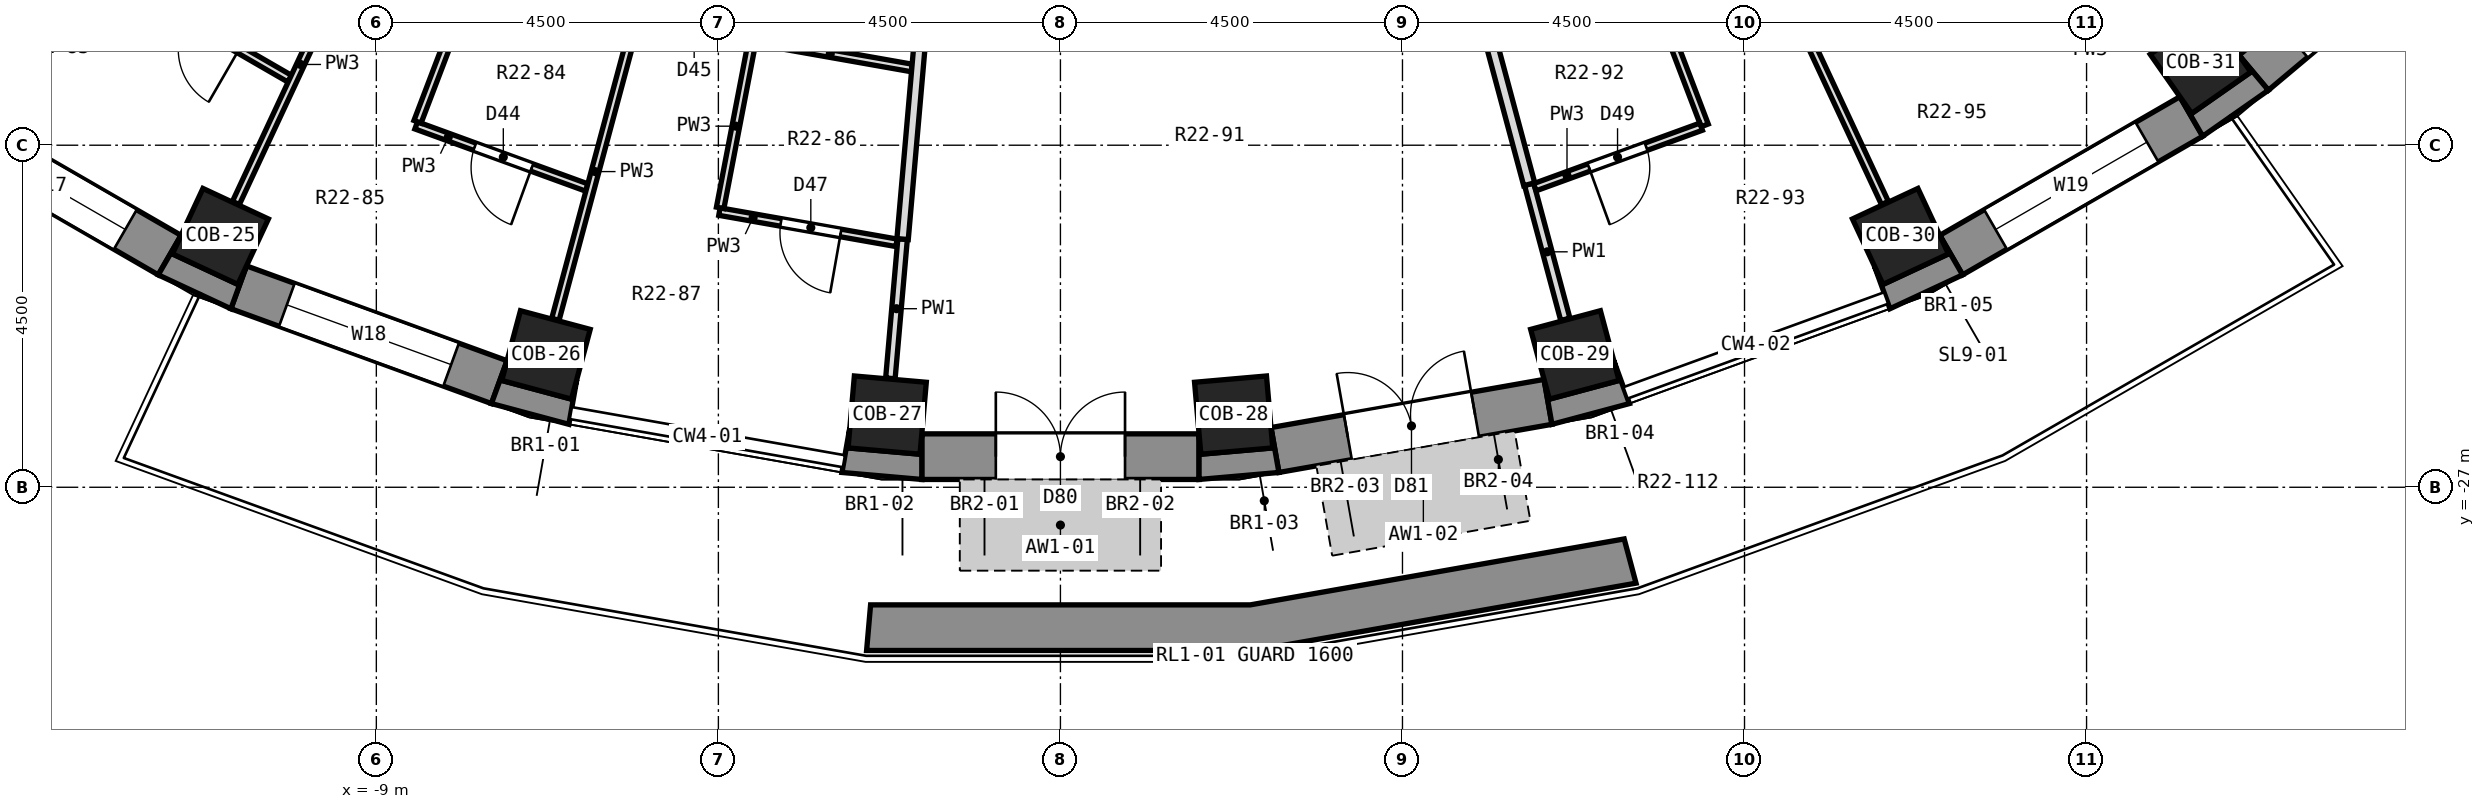
"""IFC4 building model, lengths in metres.
Left out: names, types, materials, properties, quantities, classifications, styles, units other than length and angle.
Written with IfcOpenShell. Run it as: python <this file> out.ifc"""

import sys

from ifc_helpers import new_model, si_unit, direction, frame, frame_2d, origin, origin_2d, place, context, subcontext, project, spatial, polyline, rectangle, outline, extrude, element, fill, save


model = new_model("IFC4")
c1 = context("Model", 3, precision=1e-05, world=origin(), true_north=direction((0.0, 1.0)))
c2 = subcontext(c1, "Body", "Model", "MODEL_VIEW")
j1 = project(units=[si_unit("LENGTHUNIT", "METRE"), si_unit("PLANEANGLEUNIT", "RADIAN")], contexts=[c1])
p1 = place(None, origin())
s1 = spatial("IfcSite", under=j1, at=p1, CompositionType="ELEMENT")
p2 = place(p1, origin())
s2 = spatial("IfcBuilding", under=s1, at=p2, CompositionType="ELEMENT")
p3 = place(p2, frame((0.0, 0.0, 141.4)))
s3 = spatial("IfcBuildingStorey", under=s2, at=p3, CompositionType="ELEMENT", Elevation=141.4)
for number, where, z_axis, x_axis in (
    (1, (-11.052, -23.7, 0.0), (0.0, 0.0, 1.0), (-0.423, -0.906, 0.0)),
    (2, (-6.768, -25.259, 0.0), (0.0, 0.0, 1.0), (-0.259, -0.966, 0.0)),
    (3, (-2.279, -26.051, 0.0), (0.0, 0.0, 1.0), (-0.087, -0.996, 0.0)),
    (4, (2.279, -26.051, 0.0), (0.0, 0.0, 1.0), (0.087, -0.996, 0.0)),
    (5, (6.768, -25.259, 0.0), (0.0, 0.0, 1.0), (0.259, -0.966, 0.0)),
    (6, (11.052, -23.7, 0.0), (0.0, 0.0, 1.0), (0.423, -0.906, 0.0)),
    (7, (14.999, -21.421, 0.0), (0.0, 0.0, 1.0), (0.574, -0.819, 0.0)),
):
    element("IfcColumn", number, at=place(p3, frame(where, z_axis=z_axis, x_axis=x_axis)), inside=s3, PredefinedType="COLUMN", context=c2, shape_type="SweptSolid", body=[
        extrude(rectangle(XDim=0.95, YDim=0.95, at=origin_2d()), origin(), (0.0, 0.0, 1.0), 3.3),
    ])
p4 = place(p3, frame((-14.878, -22.122, 0.0), z_axis=(0.0, 0.0, 1.0), x_axis=(0.866051847062, -0.499954196102, 0.0)))
e8 = element("IfcWall", 8, at=p4, inside=s3, PredefinedType="SOLIDWALL", context=c2, shape_type="SweptSolid", body=[
    extrude(rectangle(XDim=3.648, YDim=0.6, at=frame_2d((1.824, 0.0))), origin(), (0.0, 0.0, 1.0), 2.8),
])
p5 = place(p4, frame((0.674, 0.0, 0.9)))
e9 = element("IfcOpeningElement", 9, at=p5, cuts=e8, PredefinedType="OPENING", context=c2, shape_type="SweptSolid", body=[
    extrude(rectangle(XDim=2.3, YDim=1.8, at=frame_2d((1.15, 0.9))), frame((0.0, 0.312, 0.0), z_axis=(0.0, -1.0, 0.0), x_axis=(1.0, 0.0, 0.0)), (0.0, 0.0, 1.0), 0.624),
])
p6 = place(p3, frame((-10.811, -24.369, 0.0), z_axis=(0.0, 0.0, 1.0), x_axis=(0.939703505393, -0.341990236633, 0.0)))
e10 = element("IfcWall", 10, at=p6, inside=s3, PredefinedType="SOLIDWALL", context=c2, shape_type="SweptSolid", body=[
    extrude(rectangle(XDim=3.648, YDim=0.6, at=frame_2d((1.824, 0.0))), origin(), (0.0, 0.0, 1.0), 2.8),
])
p7 = place(p6, frame((0.674, 0.0, 0.9)))
e11 = element("IfcOpeningElement", 11, at=p7, cuts=e10, PredefinedType="OPENING", context=c2, shape_type="SweptSolid", body=[
    extrude(rectangle(XDim=2.3, YDim=1.8, at=frame_2d((1.15, 0.9))), frame((0.0, 0.312, 0.0), z_axis=(0.0, -1.0, 0.0), x_axis=(1.0, 0.0, 0.0)), (0.0, 0.0, 1.0), 0.624),
])
p8 = place(p3, frame((-1.824, -26.597, 0.0), z_axis=(0.0, 0.0, 1.0), x_axis=(1.0, 0.0, 0.0)))
e12 = element("IfcWall", 12, at=p8, inside=s3, PredefinedType="SOLIDWALL", context=c2, shape_type="SweptSolid", body=[
    extrude(rectangle(XDim=3.648, YDim=0.6, at=frame_2d((1.824, 0.0))), origin(), (0.0, 0.0, 1.0), 2.8),
])
p9 = place(p8, frame((0.974, 0.0, 0.0)))
e13 = element("IfcOpeningElement", 13, at=p9, cuts=e12, PredefinedType="OPENING", context=c2, shape_type="SweptSolid", body=[
    extrude(rectangle(XDim=1.7, YDim=2.4, at=frame_2d((0.85, 1.2))), frame((0.0, 0.312, 0.0), z_axis=(0.0, -1.0, 0.0), x_axis=(1.0, 0.0, 0.0)), (0.0, 0.0, 1.0), 0.624),
])
p10 = place(p3, frame((2.822, -26.51, 0.0), z_axis=(0.0, 0.0, 1.0), x_axis=(0.984803764455, 0.173670796382, 0.0)))
e14 = element("IfcWall", 14, at=p10, inside=s3, PredefinedType="SOLIDWALL", context=c2, shape_type="SweptSolid", body=[
    extrude(rectangle(XDim=3.648, YDim=0.6, at=frame_2d((1.824, 0.0))), origin(), (0.0, 0.0, 1.0), 2.8),
])
p11 = place(p10, frame((0.974, 0.0, 0.0)))
e15 = element("IfcOpeningElement", 15, at=p11, cuts=e14, PredefinedType="OPENING", context=c2, shape_type="SweptSolid", body=[
    extrude(rectangle(XDim=1.7, YDim=2.4, at=frame_2d((0.85, 1.2))), frame((0.0, 0.312, 0.0), z_axis=(0.0, -1.0, 0.0), x_axis=(1.0, 0.0, 0.0)), (0.0, 0.0, 1.0), 0.624),
])
p12 = place(p3, frame((11.719, -23.946, 0.0), z_axis=(0.0, 0.0, 1.0), x_axis=(0.866051847062, 0.499954196102, 0.0)))
e16 = element("IfcWall", 16, at=p12, inside=s3, PredefinedType="SOLIDWALL", context=c2, shape_type="SweptSolid", body=[
    extrude(rectangle(XDim=3.648, YDim=0.6, at=frame_2d((1.824, 0.0))), origin(), (0.0, 0.0, 1.0), 2.8),
])
p13 = place(p12, frame((0.674, 0.0, 0.9)))
e17 = element("IfcOpeningElement", 17, at=p13, cuts=e16, PredefinedType="OPENING", context=c2, shape_type="SweptSolid", body=[
    extrude(rectangle(XDim=2.3, YDim=1.8, at=frame_2d((1.15, 0.9))), frame((0.0, 0.312, 0.0), z_axis=(0.0, -1.0, 0.0), x_axis=(1.0, 0.0, 0.0)), (0.0, 0.0, 1.0), 0.624),
])
p14 = place(p3, frame((15.699, -21.547, 0.0), z_axis=(0.0, 0.0, 1.0), x_axis=(0.766055462616, 0.642774476932, 0.0)))
e18 = element("IfcWall", 18, at=p14, inside=s3, PredefinedType="SOLIDWALL", context=c2, shape_type="SweptSolid", body=[
    extrude(rectangle(XDim=3.648, YDim=0.6, at=frame_2d((1.824, 0.0))), origin(), (0.0, 0.0, 1.0), 2.8),
])
p15 = place(p14, frame((0.674, 0.0, 0.9)))
e19 = element("IfcOpeningElement", 19, at=p15, cuts=e18, PredefinedType="OPENING", context=c2, shape_type="SweptSolid", body=[
    extrude(rectangle(XDim=2.3, YDim=1.8, at=frame_2d((1.15, 0.9))), frame((0.0, 0.312, 0.0), z_axis=(0.0, -1.0, 0.0), x_axis=(1.0, 0.0, 0.0)), (0.0, 0.0, 1.0), 0.624),
])
p16 = place(p3, origin())
e20 = element("IfcWall", 20, at=p16, inside=s3, PredefinedType="SOLIDWALL", context=c2, shape_type="SweptSolid", body=[
    extrude(outline(polyline([(-10.913, -24.651), (-10.708, -24.087), (-10.822, -24.331), (-11.683, -23.93), (-11.569, -23.686), (-11.869, -24.206), (-10.913, -24.651)])), origin(), (0.0, 0.0, 1.0), 2.8),
])
p17 = place(p3, origin())
e21 = element("IfcWall", 21, at=p17, inside=s3, PredefinedType="SOLIDWALL", context=c2, shape_type="SweptSolid", body=[
    extrude(outline(polyline([(-7.486, -25.899), (-6.467, -26.172), (-6.363, -25.581), (-6.432, -25.841), (-7.35, -25.595), (-7.28, -25.335), (-7.486, -25.899)])), origin(), (0.0, 0.0, 1.0), 2.8),
])
p18 = place(p3, origin())
e22 = element("IfcWall", 22, at=p18, inside=s3, PredefinedType="SOLIDWALL", context=c2, shape_type="SweptSolid", body=[
    extrude(outline(polyline([(-2.875, -26.805), (-1.824, -26.897), (-1.824, -26.297), (-1.847, -26.565), (-2.794, -26.482), (-2.77, -26.215), (-2.875, -26.805)])), origin(), (0.0, 0.0, 1.0), 2.8),
])
p19 = place(p3, origin())
e23 = element("IfcWall", 23, at=p19, inside=s3, PredefinedType="SOLIDWALL", context=c2, shape_type="SweptSolid", body=[
    extrude(outline(polyline([(2.875, -26.805), (2.77, -26.215), (2.794, -26.482), (1.847, -26.565), (1.824, -26.297), (1.824, -26.897), (2.875, -26.805)])), origin(), (0.0, 0.0, 1.0), 2.8),
])
p20 = place(p3, origin())
e24 = element("IfcWall", 24, at=p20, inside=s3, PredefinedType="SOLIDWALL", context=c2, shape_type="SweptSolid", body=[
    extrude(outline(polyline([(6.467, -26.172), (7.486, -25.899), (7.28, -25.335), (7.35, -25.595), (6.432, -25.841), (6.363, -25.581), (6.467, -26.172)])), origin(), (0.0, 0.0, 1.0), 2.8),
])
p21 = place(p3, origin())
e25 = element("IfcWall", 25, at=p21, inside=s3, PredefinedType="SOLIDWALL", context=c2, shape_type="SweptSolid", body=[
    extrude(outline(polyline([(10.913, -24.651), (11.869, -24.206), (11.569, -23.686), (11.683, -23.93), (10.822, -24.331), (10.708, -24.087), (10.913, -24.651)])), origin(), (0.0, 0.0, 1.0), 2.8),
])
p22 = place(p3, origin())
e26 = element("IfcWall", 26, at=p22, inside=s3, PredefinedType="SOLIDWALL", context=c2, shape_type="SweptSolid", body=[
    extrude(outline(polyline([(15.892, -21.777), (15.506, -21.317), (15.661, -21.538), (14.882, -22.083), (14.728, -21.862), (15.028, -22.382), (15.892, -21.777)])), origin(), (0.0, 0.0, 1.0), 2.8),
])
p23 = place(p3, origin())
e27 = element("IfcWall", 27, at=p23, inside=s3, PredefinedType="PARAPET", context=c2, shape_type="SweptSolid", body=[
    extrude(outline(polyline([(-2.55, -29.147), (2.55, -29.147), (7.573, -28.262), (7.417, -27.68), (2.498, -28.547), (-2.498, -28.547), (-2.55, -29.147)])), origin(), (0.0, 0.0, 1.0), 0.5),
])
p24 = place(p3, frame((6.166, -23.014, 0.0), z_axis=(0.0, 0.0, 1.0), x_axis=(0.258802424466, -0.965930279622, 0.0)))
e28 = element("IfcWall", 28, at=p24, inside=s3, PredefinedType="PARTITIONING", context=c2, shape_type="SweptSolid", body=[
    extrude(rectangle(XDim=1.84, YDim=0.125, at=frame_2d((0.92, 0.0))), origin(), (0.0, 0.0, 1.0), 2.8),
])
p25 = place(p3, frame((4.288, -16.002, 0.0), z_axis=(0.0, 0.0, 1.0), x_axis=(0.25900000819, -0.965877319207, 0.0)))
e29 = element("IfcWall", 29, at=p25, inside=s3, PredefinedType="PARTITIONING", context=c2, shape_type="SweptSolid", body=[
    extrude(rectangle(XDim=7.259, YDim=0.15, at=frame_2d((3.63, 0.0))), origin(), (0.0, 0.0, 1.0), 2.8),
])
p26 = place(p3, frame((7.657, -20.09, 0.0), z_axis=(0.0, 0.0, 1.0), x_axis=(0.35616749028, -0.934422130981, 0.0)))
e30 = element("IfcWall", 30, at=p26, inside=s3, PredefinedType="PARTITIONING", context=c2, shape_type="SweptSolid", body=[
    extrude(rectangle(XDim=2.3, YDim=0.1, at=frame_2d((1.15, 0.0))), origin(), (0.0, 0.0, 1.0), 2.8),
])
p27 = place(p3, frame((5.794, -12.43, 0.0), z_axis=(0.0, 0.0, 1.0), x_axis=(0.422795993745, -0.906224888023, 0.0)))
e31 = element("IfcWall", 31, at=p27, inside=s3, PredefinedType="PARTITIONING", context=c2, shape_type="SweptSolid", body=[
    extrude(rectangle(XDim=11.951, YDim=0.1, at=frame_2d((5.975, 0.0))), origin(), (0.0, 0.0, 1.0), 2.8),
])
p28 = place(p27, frame((3.451, 0.0, 0.0)))
e32 = element("IfcOpeningElement", 32, at=p28, cuts=e31, PredefinedType="OPENING", context=c2, shape_type="SweptSolid", body=[
    extrude(rectangle(XDim=0.9, YDim=2.1, at=frame_2d((0.45, 1.05))), frame((0.0, 0.062, 0.0), z_axis=(0.0, -1.0, 0.0), x_axis=(1.0, 0.0, 0.0)), (0.0, 0.0, 1.0), 0.124),
])
p29 = place(p3, frame((-12.209, -20.43, 0.0), z_axis=(0.0, 0.0, 1.0), x_axis=(0.865989934965, -0.500061428766, 0.0)))
e33 = element("IfcWall", 33, at=p29, inside=s3, PredefinedType="PARTITIONING", context=c2, shape_type="SweptSolid", body=[
    extrude(rectangle(XDim=2.39, YDim=0.1, at=frame_2d((1.195, 0.0))), origin(), (0.0, 0.0, 1.0), 2.8),
])
p30 = place(p29, frame((0.82, 0.0, 0.0)))
e34 = element("IfcOpeningElement", 34, at=p30, cuts=e33, PredefinedType="OPENING", context=c2, shape_type="SweptSolid", body=[
    extrude(rectangle(XDim=0.8, YDim=2.1, at=frame_2d((0.4, 1.05))), frame((0.0, 0.062, 0.0), z_axis=(0.0, -1.0, 0.0), x_axis=(1.0, 0.0, 0.0)), (0.0, 0.0, 1.0), 0.124),
])
p31 = place(p3, frame((-8.476, -22.239, 0.0), z_axis=(0.0, 0.0, 1.0), x_axis=(0.939644231496, -0.342153062556, 0.0)))
e35 = element("IfcWall", 35, at=p31, inside=s3, PredefinedType="PARTITIONING", context=c2, shape_type="SweptSolid", body=[
    extrude(rectangle(XDim=2.39, YDim=0.1, at=frame_2d((1.195, 0.0))), origin(), (0.0, 0.0, 1.0), 2.8),
])
p32 = place(p31, frame((0.82, 0.0, 0.0)))
e36 = element("IfcOpeningElement", 36, at=p32, cuts=e35, PredefinedType="OPENING", context=c2, shape_type="SweptSolid", body=[
    extrude(rectangle(XDim=0.8, YDim=2.1, at=frame_2d((0.4, 1.05))), frame((0.0, 0.062, 0.0), z_axis=(0.0, -1.0, 0.0), x_axis=(1.0, 0.0, 0.0)), (0.0, 0.0, 1.0), 0.124),
])
p33 = place(p3, frame((-4.486, -23.373, 0.0), z_axis=(0.0, 0.0, 1.0), x_axis=(0.984805365509, -0.173661717325, 0.0)))
e37 = element("IfcWall", 37, at=p33, inside=s3, PredefinedType="PARTITIONING", context=c2, shape_type="SweptSolid", body=[
    extrude(rectangle(XDim=2.366, YDim=0.1, at=frame_2d((1.183, 0.0))), origin(), (0.0, 0.0, 1.0), 2.8),
])
p34 = place(p33, frame((0.821, 0.0, 0.0)))
e38 = element("IfcOpeningElement", 38, at=p34, cuts=e37, PredefinedType="OPENING", context=c2, shape_type="SweptSolid", body=[
    extrude(rectangle(XDim=0.8, YDim=2.1, at=frame_2d((0.4, 1.05))), frame((0.0, 0.062, 0.0), z_axis=(0.0, -1.0, 0.0), x_axis=(1.0, 0.0, 0.0)), (0.0, 0.0, 1.0), 0.124),
])
p35 = place(p3, frame((-4.101, -21.105, 0.0), z_axis=(0.0, 0.0, 1.0), x_axis=(0.984793705714, -0.173727825019, 0.0)))
e39 = element("IfcWall", 39, at=p35, inside=s3, PredefinedType="PARTITIONING", context=c2, shape_type="SweptSolid", body=[
    extrude(rectangle(XDim=2.18, YDim=0.1, at=frame_2d((1.09, 0.0))), origin(), (0.0, 0.0, 1.0), 2.8),
])
p36 = place(p3, frame((6.242, -23.053, 0.0), z_axis=(0.0, 0.0, 1.0), x_axis=(0.939618756308, 0.342223016166, 0.0)))
e40 = element("IfcWall", 40, at=p36, inside=s3, PredefinedType="PARTITIONING", context=c2, shape_type="SweptSolid", body=[
    extrude(rectangle(XDim=2.328, YDim=0.1, at=frame_2d((1.164, 0.0))), origin(), (0.0, 0.0, 1.0), 2.8),
])
p37 = place(p36, frame((0.758, 0.0, 0.0)))
e41 = element("IfcOpeningElement", 41, at=p37, cuts=e40, PredefinedType="OPENING", context=c2, shape_type="SweptSolid", body=[
    extrude(rectangle(XDim=0.8, YDim=2.1, at=frame_2d((0.4, 1.05))), frame((0.0, 0.062, 0.0), z_axis=(0.0, -1.0, 0.0), x_axis=(1.0, 0.0, 0.0)), (0.0, 0.0, 1.0), 0.124),
])
p38 = place(p3, frame((-10.848, -23.26, 0.0), z_axis=(0.0, 0.0, 1.0), x_axis=(0.422895432818, 0.906178488434, 0.0)))
e42 = element("IfcWall", 42, at=p38, inside=s3, PredefinedType="PARTITIONING", context=c2, shape_type="SweptSolid", body=[
    extrude(rectangle(XDim=4.023, YDim=0.1, at=frame_2d((2.011, 0.0))), origin(), (0.0, 0.0, 1.0), 2.8),
])
p39 = place(p3, frame((-8.458, -22.192, 0.0), z_axis=(0.0, 0.0, 1.0), x_axis=(0.35615776917, 0.934425836255, 0.0)))
e43 = element("IfcWall", 43, at=p39, inside=s3, PredefinedType="PARTITIONING", context=c2, shape_type="SweptSolid", body=[
    extrude(rectangle(XDim=2.188, YDim=0.1, at=frame_2d((1.094, 0.0))), origin(), (0.0, 0.0, 1.0), 2.8),
])
p40 = place(p3, frame((-6.644, -24.79, 0.0), z_axis=(0.0, 0.0, 1.0), x_axis=(0.259176889868, 0.965829871022, 0.0)))
e44 = element("IfcWall", 44, at=p40, inside=s3, PredefinedType="PARTITIONING", context=c2, shape_type="SweptSolid", body=[
    extrude(rectangle(XDim=4.023, YDim=0.1, at=frame_2d((2.012, 0.0))), origin(), (0.0, 0.0, 1.0), 2.8),
])
p41 = place(p3, frame((-4.477, -23.324, 0.0), z_axis=(0.0, 0.0, 1.0), x_axis=(0.188685986474, 0.982037473067, 0.0)))
e45 = element("IfcWall", 45, at=p41, inside=s3, PredefinedType="PARTITIONING", context=c2, shape_type="SweptSolid", body=[
    extrude(rectangle(XDim=2.188, YDim=0.1, at=frame_2d((1.094, 0.0))), origin(), (0.0, 0.0, 1.0), 2.8),
])
p42 = place(p3, frame((-2.237, -25.567, 0.0), z_axis=(0.0, 0.0, 1.0), x_axis=(0.087185058121, 0.996192132894, 0.0)))
e46 = element("IfcWall", 46, at=p42, inside=s3, PredefinedType="PARTITIONING", context=c2, shape_type="SweptSolid", body=[
    extrude(rectangle(XDim=1.84, YDim=0.125, at=frame_2d((0.92, 0.0))), origin(), (0.0, 0.0, 1.0), 2.8),
])
p43 = place(p3, frame((-2.077, -23.735, 0.0), z_axis=(0.0, 0.0, 1.0), x_axis=(0.087062572149, 0.996202845073, 0.0)))
e47 = element("IfcWall", 47, at=p43, inside=s3, PredefinedType="PARTITIONING", context=c2, shape_type="SweptSolid", body=[
    extrude(rectangle(XDim=7.689, YDim=0.15, at=frame_2d((3.845, 0.0))), origin(), (0.0, 0.0, 1.0), 2.8),
])
p44 = place(p5, origin())
e48 = element("IfcWindow", 48, at=p44, inside=s3, PartitioningType="SINGLE_PANEL", PredefinedType="WINDOW", context=c2, shape_type="SweptSolid", body=[
    extrude(rectangle(XDim=2.3, YDim=1.8, at=frame_2d((1.15, 0.9))), frame((0.0, 0.18, 0.0), z_axis=(0.0, -1.0, 0.0), x_axis=(1.0, 0.0, 0.0)), (0.0, 0.0, 1.0), 0.06),
])
fill(e9, e48)
p45 = place(p7, origin())
e49 = element("IfcWindow", 49, at=p45, inside=s3, PartitioningType="SINGLE_PANEL", PredefinedType="WINDOW", context=c2, shape_type="SweptSolid", body=[
    extrude(rectangle(XDim=2.3, YDim=1.8, at=frame_2d((1.15, 0.9))), frame((0.0, 0.18, 0.0), z_axis=(0.0, -1.0, 0.0), x_axis=(1.0, 0.0, 0.0)), (0.0, 0.0, 1.0), 0.06),
])
fill(e11, e49)
p46 = place(p9, origin())
e50 = element("IfcDoor", 50, at=p46, inside=s3, OperationType="DOUBLE_DOOR_SINGLE_SWING", PredefinedType="DOOR", context=c2, shape_type="SweptSolid", body=[
    extrude(rectangle(XDim=1.7, YDim=2.4, at=frame_2d((0.85, 1.2))), frame((0.0, 0.125, 0.0), z_axis=(0.0, -1.0, 0.0), x_axis=(1.0, 0.0, 0.0)), (0.0, 0.0, 1.0), 0.05),
])
fill(e13, e50)
p47 = place(p11, origin())
e51 = element("IfcDoor", 51, at=p47, inside=s3, OperationType="DOUBLE_DOOR_SINGLE_SWING", PredefinedType="DOOR", context=c2, shape_type="SweptSolid", body=[
    extrude(rectangle(XDim=1.7, YDim=2.4, at=frame_2d((0.85, 1.2))), frame((0.0, 0.125, 0.0), z_axis=(0.0, -1.0, 0.0), x_axis=(1.0, 0.0, 0.0)), (0.0, 0.0, 1.0), 0.05),
])
fill(e15, e51)
p48 = place(p13, origin())
e52 = element("IfcWindow", 52, at=p48, inside=s3, PartitioningType="SINGLE_PANEL", PredefinedType="WINDOW", context=c2, shape_type="SweptSolid", body=[
    extrude(rectangle(XDim=2.3, YDim=1.8, at=frame_2d((1.15, 0.9))), frame((0.0, 0.18, 0.0), z_axis=(0.0, -1.0, 0.0), x_axis=(1.0, 0.0, 0.0)), (0.0, 0.0, 1.0), 0.06),
])
fill(e17, e52)
p49 = place(p32, frame((0.8, 0.0, 0.0), z_axis=(0.0, 0.0, 1.0), x_axis=(-1.0, 0.0, 0.0)))
e53 = element("IfcDoor", 53, at=p49, inside=s3, OperationType="SINGLE_SWING_LEFT", PredefinedType="DOOR", context=c2, shape_type="SweptSolid", body=[
    extrude(rectangle(XDim=0.8, YDim=2.1, at=frame_2d((0.4, 1.05))), frame((0.0, 0.025, 0.0), z_axis=(0.0, -1.0, 0.0), x_axis=(1.0, 0.0, 0.0)), (0.0, 0.0, 1.0), 0.05),
])
fill(e36, e53)
p50 = place(p34, frame((0.8, 0.0, 0.0), z_axis=(0.0, 0.0, 1.0), x_axis=(-1.0, 0.0, 0.0)))
e54 = element("IfcDoor", 54, at=p50, inside=s3, OperationType="SINGLE_SWING_LEFT", PredefinedType="DOOR", context=c2, shape_type="SweptSolid", body=[
    extrude(rectangle(XDim=0.8, YDim=2.1, at=frame_2d((0.4, 1.05))), frame((0.0, 0.025, 0.0), z_axis=(0.0, -1.0, 0.0), x_axis=(1.0, 0.0, 0.0)), (0.0, 0.0, 1.0), 0.05),
])
fill(e38, e54)
p51 = place(p37, frame((0.8, 0.0, 0.0), z_axis=(0.0, 0.0, 1.0), x_axis=(-1.0, 0.0, 0.0)))
e55 = element("IfcDoor", 55, at=p51, inside=s3, OperationType="SINGLE_SWING_RIGHT", PredefinedType="DOOR", context=c2, shape_type="SweptSolid", body=[
    extrude(rectangle(XDim=0.8, YDim=2.1, at=frame_2d((0.4, 1.05))), frame((0.0, 0.025, 0.0), z_axis=(0.0, -1.0, 0.0), x_axis=(1.0, 0.0, 0.0)), (0.0, 0.0, 1.0), 0.05),
])
fill(e41, e55)
save(model, sys.argv[1])
